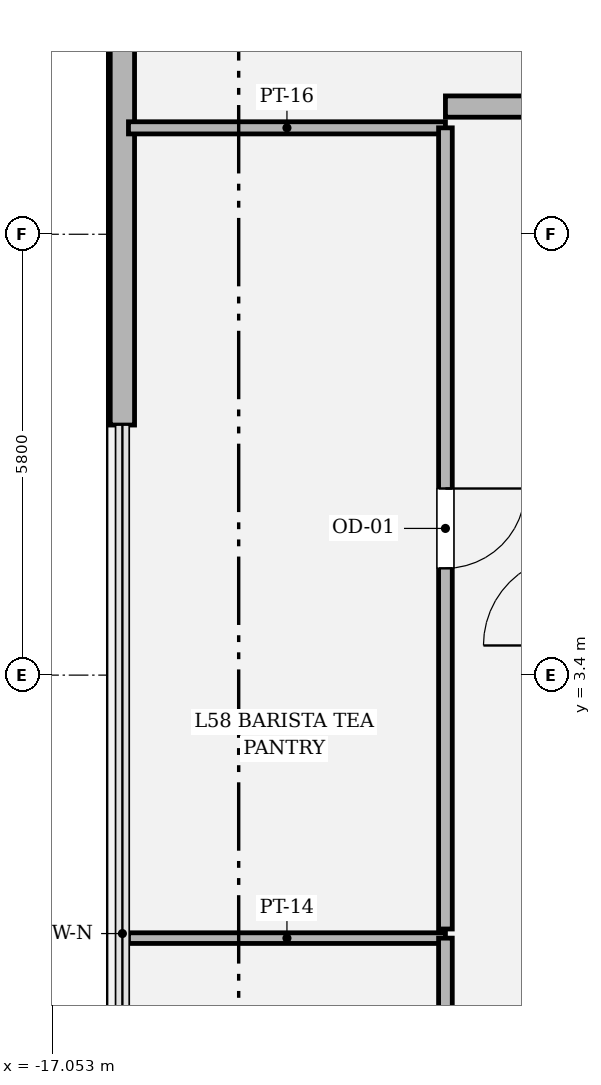
"""IFC4 building model, lengths in metres.
Left out: names, types, materials, properties, quantities, classifications, styles, units other than length and angle.
Written with IfcOpenShell. Run it as: python <this file> out.ifc"""

import sys

from ifc_helpers import new_model, si_unit, direction, frame, frame_2d, origin, place, context, subcontext, project, spatial, rectangle, extrude, element, fill, save


model = new_model("IFC4")
c1 = context("Model", 3, precision=1e-05, world=origin(), true_north=direction((0.0, 1.0)))
c2 = subcontext(c1, "Body", "Model", "MODEL_VIEW")
j1 = project(units=[si_unit("LENGTHUNIT", "METRE"), si_unit("PLANEANGLEUNIT", "RADIAN")], contexts=[c1])
p1 = place(None, origin())
s1 = spatial("IfcSite", under=j1, at=p1, CompositionType="ELEMENT")
p2 = place(p1, origin())
s2 = spatial("IfcBuilding", under=s1, at=p2, CompositionType="ELEMENT")
p3 = place(p2, frame((0.0, 0.0, 246.6)))
s3 = spatial("IfcBuildingStorey", under=s2, at=p3, CompositionType="ELEMENT", Elevation=246.6)
p4 = place(p3, frame((-16.13, 13.727, 0.0), z_axis=(0.0, 0.0, 1.0), x_axis=(0.0, -1.0, 0.0)))
e1 = element("IfcWall", 1, at=p4, inside=s3, PredefinedType="SOLIDWALL", context=c2, shape_type="SweptSolid", body=[
    extrude(rectangle(XDim=7.037, YDim=0.32, at=frame_2d((3.519, 0.0))), origin(), (0.0, 0.0, 1.0), 3.194),
])
p5 = place(p3, frame((-16.05, -0.06, 0.0), z_axis=(0.0, 0.0, 1.0), x_axis=(1.0, 0.0, 0.0)))
e2 = element("IfcWall", 2, at=p5, inside=s3, PredefinedType="PARTITIONING", context=c2, shape_type="SweptSolid", body=[
    extrude(rectangle(XDim=4.17, YDim=0.14, at=frame_2d((2.085, 0.0))), origin(), (0.0, 0.0, 1.0), 4.52),
])
p6 = place(p3, frame((-11.88, -0.06, 0.0), z_axis=(0.0, 0.0, 1.0), x_axis=(0.0, -1.0, 0.0)))
e3 = element("IfcWall", 3, at=p6, inside=s3, PredefinedType="PARTITIONING", context=c2, shape_type="SweptSolid", body=[
    extrude(rectangle(XDim=10.54, YDim=0.18, at=frame_2d((5.27, 0.0))), origin(), (0.0, 0.0, 1.0), 3.194),
])
p7 = place(p6, frame((4.745, 0.0, 0.0)))
e4 = element("IfcOpeningElement", 4, at=p7, cuts=e3, PredefinedType="OPENING", context=c2, shape_type="SweptSolid", body=[
    extrude(rectangle(XDim=1.05, YDim=2.2, at=frame_2d((0.525, 1.1))), frame((0.0, 0.1, 0.0), z_axis=(0.0, -1.0, 0.0), x_axis=(1.0, 0.0, 0.0)), (0.0, 0.0, 1.0), 0.2),
])
p8 = place(p3, frame((-16.05, 10.6, 0.0), z_axis=(0.0, 0.0, 1.0), x_axis=(1.0, 0.0, 0.0)))
e5 = element("IfcWall", 5, at=p8, inside=s3, PredefinedType="PARTITIONING", context=c2, shape_type="SweptSolid", body=[
    extrude(rectangle(XDim=4.17, YDim=0.16, at=frame_2d((2.085, 0.0))), origin(), (0.0, 0.0, 1.0), 4.154),
])
p9 = place(p3, frame((-11.88, 10.6, 0.0), z_axis=(0.0, 0.0, 1.0), x_axis=(0.0, -1.0, 0.0)))
e6 = element("IfcWall", 6, at=p9, inside=s3, PredefinedType="PARTITIONING", context=c2, shape_type="SweptSolid", body=[
    extrude(rectangle(XDim=10.54, YDim=0.18, at=frame_2d((5.27, 0.0))), origin(), (0.0, 0.0, 1.0), 3.194),
])
p10 = place(p9, frame((4.745, 0.0, 0.0)))
e7 = element("IfcOpeningElement", 7, at=p10, cuts=e6, PredefinedType="OPENING", context=c2, shape_type="SweptSolid", body=[
    extrude(rectangle(XDim=1.05, YDim=2.2, at=frame_2d((0.525, 1.1))), frame((0.0, 0.1, 0.0), z_axis=(0.0, -1.0, 0.0), x_axis=(1.0, 0.0, 0.0)), (0.0, 0.0, 1.0), 0.2),
])
p11 = place(p3, frame((1.286, 10.88, 0.0), z_axis=(0.0, 0.0, 1.0), x_axis=(-1.0, 0.0, 0.0)))
e8 = element("IfcWall", 8, at=p11, inside=s3, PredefinedType="SOLIDWALL", context=c2, shape_type="SweptSolid", body=[
    extrude(rectangle(XDim=13.166, YDim=0.28, at=frame_2d((6.583, 0.0))), origin(), (0.0, 0.0, 1.0), 3.194),
])
p12 = place(p11, frame((5.733, 0.0, 0.0)))
e9 = element("IfcOpeningElement", 9, at=p12, cuts=e8, PredefinedType="OPENING", context=c2, shape_type="SweptSolid", body=[
    extrude(rectangle(XDim=1.7, YDim=2.3, at=frame_2d((0.85, 1.15))), frame((0.0, 0.15, 0.0), z_axis=(0.0, -1.0, 0.0), x_axis=(1.0, 0.0, 0.0)), (0.0, 0.0, 1.0), 0.3),
])
p13 = place(p10, origin())
e10 = element("IfcDoor", 10, at=p13, inside=s3, OperationType="SINGLE_SWING_LEFT", PredefinedType="DOOR", context=c2, shape_type="SweptSolid", body=[
    extrude(rectangle(XDim=1.05, YDim=2.2, at=frame_2d((0.525, 1.1))), frame((0.0, 0.025, 0.0), z_axis=(0.0, -1.0, 0.0), x_axis=(1.0, 0.0, 0.0)), (0.0, 0.0, 1.0), 0.05),
])
fill(e7, e10)
save(model, sys.argv[1])
